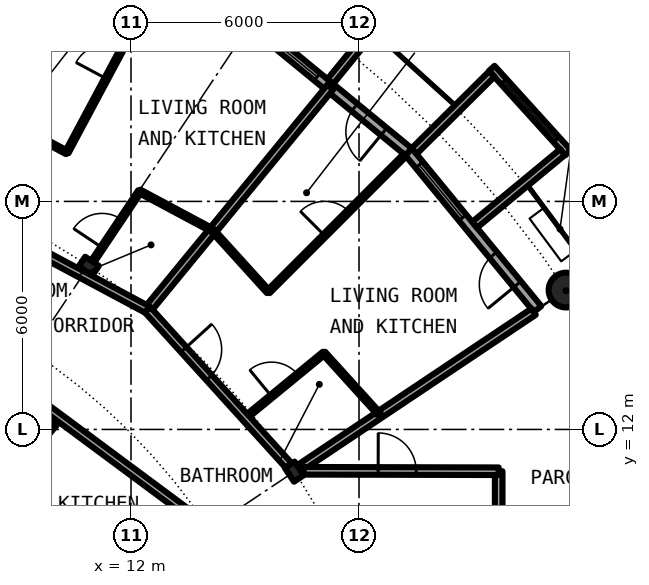
"""IFC4 building model, lengths in metres.
Left out: names, types, materials, properties, quantities, classifications, styles, units other than length and angle.
Written with IfcOpenShell. Run it as: python <this file> out.ifc"""

import sys

from ifc_helpers import new_model, si_unit, direction, frame, frame_2d, origin, origin_2d, place, context, subcontext, project, spatial, rectangle, circle, hollow_circle, i_section, extrude, element, fill, save


model = new_model("IFC4")
c1 = context("Model", 3, precision=1e-05, world=origin(), true_north=direction((0.0, 1.0)))
c2 = subcontext(c1, "Body", "Model", "MODEL_VIEW")
j1 = project(units=[si_unit("LENGTHUNIT", "METRE"), si_unit("PLANEANGLEUNIT", "RADIAN")], contexts=[c1])
p1 = place(None, origin())
s1 = spatial("IfcSite", under=j1, at=p1, CompositionType="ELEMENT")
p2 = place(p1, origin())
s2 = spatial("IfcBuilding", under=s1, at=p2, CompositionType="ELEMENT")
p3 = place(p2, frame((0.0, 0.0, 120.8)))
s3 = spatial("IfcBuildingStorey", under=s2, at=p3, CompositionType="ELEMENT", Elevation=120.8)
p4 = place(p3, frame((23.448, 15.667, 0.0), z_axis=(0.0, 0.0, 1.0), x_axis=(1.0, 0.0, 0.0)))
e1 = element("IfcColumn", 1, at=p4, inside=s3, PredefinedType="COLUMN", context=c2, shape_type="SweptSolid", body=[
    extrude(hollow_circle(Radius=0.457, WallThickness=0.04, at=origin_2d()), origin(), (0.0, 0.0, 1.0), 3.05),
])
for number, where, z_axis, x_axis in (
    (2, (16.297, 10.889, 0.0), (0.0, 0.0, 1.0), (0.831, 0.556, 0.0)),
    (3, (10.889, 16.297, 0.0), (0.0, 0.0, 1.0), (0.556, 0.831, 0.0)),
):
    element("IfcColumn", number, at=place(p3, frame(where, z_axis=z_axis, x_axis=x_axis)), inside=s3, PredefinedType="COLUMN", context=c2, shape_type="SweptSolid", body=[
        extrude(i_section(OverallWidth=0.307, OverallDepth=0.432, WebThickness=0.021, FlangeThickness=0.04, FilletRadius=0.027, at=origin_2d()), origin(), (0.0, 0.0, 1.0), 3.05),
    ])
p5 = place(p3, frame((22.699, 15.167, 0.0), z_axis=(0.0, 0.0, 1.0), x_axis=(-0.634382322723, 0.773019449054, 0.0)))
e4 = element("IfcWall", 4, at=p5, inside=s3, PredefinedType="SOLIDWALL", context=c2, shape_type="SweptSolid", body=[
    extrude(rectangle(XDim=5.352, YDim=0.25, at=frame_2d((2.676, 0.0))), origin(), (0.0, 0.0, 1.0), 2.7),
])
p6 = place(p5, frame((0.841, 0.0, 0.0)))
e5 = element("IfcOpeningElement", 5, at=p6, cuts=e4, PredefinedType="OPENING", context=c2, shape_type="SweptSolid", body=[
    extrude(rectangle(XDim=1.0, YDim=2.2, at=frame_2d((0.5, 1.1))), frame((0.0, 0.135, 0.0), z_axis=(0.0, -1.0, 0.0), x_axis=(1.0, 0.0, 0.0)), (0.0, 0.0, 1.0), 0.27),
])
p7 = place(p5, frame((3.111, 0.0, 0.3)))
e6 = element("IfcOpeningElement", 6, at=p7, cuts=e4, PredefinedType="OPENING", context=c2, shape_type="SweptSolid", body=[
    extrude(rectangle(XDim=1.8, YDim=2.1, at=frame_2d((0.9, 1.05))), frame((0.0, 0.135, 0.0), z_axis=(0.0, -1.0, 0.0), x_axis=(1.0, 0.0, 0.0)), (0.0, 0.0, 1.0), 0.27),
])
p8 = place(p3, frame((23.503, 19.282, -0.03), z_axis=(0.0, 0.0, 1.0), x_axis=(-0.671506829416, 0.740998365753, 0.0)))
e7 = element("IfcWall", 7, at=p8, inside=s3, PredefinedType="SOLIDWALL", context=c2, shape_type="SweptSolid", body=[
    extrude(rectangle(XDim=2.993, YDim=0.2, at=frame_2d((1.497, 0.0))), origin(), (0.0, 0.0, 1.0), 2.73),
])
p9 = place(p8, frame((0.457, 0.0, 0.33)))
e8 = element("IfcOpeningElement", 8, at=p9, cuts=e7, PredefinedType="OPENING", context=c2, shape_type="SweptSolid", body=[
    extrude(circle(Radius=1.04, at=frame_2d((1.04, 1.04))), frame((0.0, 0.11, 0.0), z_axis=(0.0, -1.0, 0.0), x_axis=(1.0, 0.0, 0.0)), (0.0, 0.0, 1.0), 0.22),
])
p10 = place(p3, frame((21.041, 17.384, -0.03), z_axis=(0.0, 0.0, 1.0), x_axis=(0.770784861449, 0.63709551667, 0.0)))
e9 = element("IfcWall", 9, at=p10, inside=s3, PredefinedType="SOLIDWALL", context=c2, shape_type="SweptSolid", body=[
    extrude(rectangle(XDim=3.006, YDim=0.2, at=frame_2d((1.503, 0.0))), origin(), (0.0, 0.0, 1.0), 2.73),
])
p11 = place(p3, frame((19.45, 19.323, -0.03), z_axis=(0.0, 0.0, 1.0), x_axis=(0.709727076896, 0.704476739375, 0.0)))
e10 = element("IfcWall", 10, at=p11, inside=s3, PredefinedType="SOLIDWALL", context=c2, shape_type="SweptSolid", body=[
    extrude(rectangle(XDim=2.883, YDim=0.2, at=frame_2d((1.441, 0.0))), origin(), (0.0, 0.0, 1.0), 2.73),
])
p12 = place(p3, frame((19.304, 19.304, 0.0), z_axis=(0.0, 0.0, 1.0), x_axis=(-0.773019449054, 0.634382322723, 0.0)))
e11 = element("IfcWall", 11, at=p12, inside=s3, PredefinedType="SOLIDWALL", context=c2, shape_type="SweptSolid", body=[
    extrude(rectangle(XDim=5.352, YDim=0.25, at=frame_2d((2.676, 0.0))), origin(), (0.0, 0.0, 1.0), 2.7),
])
p13 = place(p12, frame((0.841, 0.0, 0.0)))
e12 = element("IfcOpeningElement", 12, at=p13, cuts=e11, PredefinedType="OPENING", context=c2, shape_type="SweptSolid", body=[
    extrude(rectangle(XDim=1.0, YDim=2.2, at=frame_2d((0.5, 1.1))), frame((0.0, 0.135, 0.0), z_axis=(0.0, -1.0, 0.0), x_axis=(1.0, 0.0, 0.0)), (0.0, 0.0, 1.0), 0.27),
])
p14 = place(p12, frame((3.111, 0.0, 0.3)))
e13 = element("IfcOpeningElement", 13, at=p14, cuts=e11, PredefinedType="OPENING", context=c2, shape_type="SweptSolid", body=[
    extrude(rectangle(XDim=1.8, YDim=2.1, at=frame_2d((0.9, 1.05))), frame((0.0, 0.135, 0.0), z_axis=(0.0, -1.0, 0.0), x_axis=(1.0, 0.0, 0.0)), (0.0, 0.0, 1.0), 0.27),
])
p15 = place(p3, frame((17.246, 21.155, -0.03), z_axis=(0.0, 0.0, 1.0), x_axis=(0.631741648902, 0.775179004516, 0.0)))
e14 = element("IfcWall", 14, at=p15, inside=s3, PredefinedType="SOLIDWALL", context=c2, shape_type="SweptSolid", body=[
    extrude(rectangle(XDim=3.006, YDim=0.2, at=frame_2d((1.503, 0.0))), origin(), (0.0, 0.0, 1.0), 2.73),
])
p16 = place(p3, frame((21.675, 9.2, 0.0), z_axis=(0.0, 0.0, 1.0), x_axis=(0.0, 1.0, 0.0)))
e15 = element("IfcWall", 15, at=p16, inside=s3, PredefinedType="PARTITIONING", context=c2, shape_type="SweptSolid", body=[
    extrude(rectangle(XDim=1.7, YDim=0.2, at=frame_2d((0.85, 0.0))), origin(), (0.0, 0.0, 1.0), 2.7),
])
p17 = place(p3, frame((4.909, 5.958, 0.0), z_axis=(0.0, 0.0, 1.0), x_axis=(0.635976043025, 0.771708800454, 0.0)))
e16 = element("IfcWall", 16, at=p17, inside=s3, PredefinedType="PARTITIONING", context=c2, shape_type="SweptSolid", body=[
    extrude(rectangle(XDim=8.213, YDim=0.1, at=frame_2d((4.106, 0.0))), origin(), (0.0, 0.0, 1.0), 2.7),
])
p18 = place(p17, frame((6.49, 0.0, 0.0)))
e17 = element("IfcOpeningElement", 17, at=p18, cuts=e16, PredefinedType="OPENING", context=c2, shape_type="SweptSolid", body=[
    extrude(rectangle(XDim=0.9, YDim=2.3, at=frame_2d((0.45, 1.15))), frame((0.0, 0.06, 0.0), z_axis=(0.0, -1.0, 0.0), x_axis=(1.0, 0.0, 0.0)), (0.0, 0.0, 1.0), 0.12),
])
p19 = place(p17, frame((2.384, 0.0, 0.0)))
e18 = element("IfcOpeningElement", 18, at=p19, cuts=e16, PredefinedType="OPENING", context=c2, shape_type="SweptSolid", body=[
    extrude(rectangle(XDim=0.9, YDim=2.3, at=frame_2d((0.45, 1.15))), frame((0.0, 0.06, 0.0), z_axis=(0.0, -1.0, 0.0), x_axis=(1.0, 0.0, 0.0)), (0.0, 0.0, 1.0), 0.12),
])
p20 = place(p3, frame((8.392, 20.314, 0.0), z_axis=(0.0, 0.0, 1.0), x_axis=(0.381673756215, 0.924297107978, 0.0)))
e19 = element("IfcWall", 19, at=p20, inside=s3, PredefinedType="PARTITIONING", context=c2, shape_type="SweptSolid", body=[
    extrude(rectangle(XDim=5.195, YDim=0.1, at=frame_2d((2.598, 0.0))), origin(), (0.0, 0.0, 1.0), 2.7),
])
p21 = place(p3, frame((10.31, 19.289, 0.0), z_axis=(0.0, 0.0, 1.0), x_axis=(0.47140999111, 0.881914179658, 0.0)))
e20 = element("IfcWall", 20, at=p21, inside=s3, PredefinedType="PARTITIONING", context=c2, shape_type="SweptSolid", body=[
    extrude(rectangle(XDim=5.303, YDim=0.1, at=frame_2d((2.652, 0.0))), origin(), (0.0, 0.0, 1.0), 2.7),
])
p22 = place(p21, frame((2.202, 0.0, 0.0)))
e21 = element("IfcOpeningElement", 21, at=p22, cuts=e20, PredefinedType="OPENING", context=c2, shape_type="SweptSolid", body=[
    extrude(rectangle(XDim=0.9, YDim=2.3, at=frame_2d((0.45, 1.15))), frame((0.0, 0.06, 0.0), z_axis=(0.0, -1.0, 0.0), x_axis=(1.0, 0.0, 0.0)), (0.0, 0.0, 1.0), 0.12),
])
p23 = place(p3, frame((11.025, 16.466, 0.0), z_axis=(0.0, 0.0, 1.0), x_axis=(0.556469477731, 0.830868052313, 0.0)))
e22 = element("IfcWall", 22, at=p23, inside=s3, PredefinedType="PARTITIONING", context=c2, shape_type="SweptSolid", body=[
    extrude(rectangle(XDim=2.164, YDim=0.1, at=frame_2d((1.082, 0.0))), origin(), (0.0, 0.0, 1.0), 2.7),
])
p24 = place(p23, frame((0.383, 0.0, 0.0)))
e23 = element("IfcOpeningElement", 23, at=p24, cuts=e22, PredefinedType="OPENING", context=c2, shape_type="SweptSolid", body=[
    extrude(rectangle(XDim=0.9, YDim=2.3, at=frame_2d((0.45, 1.15))), frame((0.0, 0.06, 0.0), z_axis=(0.0, -1.0, 0.0), x_axis=(1.0, 0.0, 0.0)), (0.0, 0.0, 1.0), 0.12),
])
p25 = place(p3, frame((12.436, 15.149, 0.0), z_axis=(0.0, 0.0, 1.0), x_axis=(0.63447412651, 0.772944100689, 0.0)))
e24 = element("IfcWall", 24, at=p25, inside=s3, PredefinedType="PARTITIONING", context=c2, shape_type="SweptSolid", body=[
    extrude(rectangle(XDim=7.576, YDim=0.2, at=frame_2d((3.788, 0.0))), origin(), (0.0, 0.0, 1.0), 2.7),
])
p26 = place(p3, frame((15.01, 12.309, 0.0), z_axis=(0.0, 0.0, 1.0), x_axis=(0.773240932873, 0.634112339992, 0.0)))
e25 = element("IfcWall", 25, at=p26, inside=s3, PredefinedType="PARTITIONING", context=c2, shape_type="SweptSolid", body=[
    extrude(rectangle(XDim=2.674, YDim=0.1, at=frame_2d((1.337, 0.0))), origin(), (0.0, 0.0, 1.0), 2.7),
])
p27 = place(p26, frame((0.887, 0.0, 0.0)))
e26 = element("IfcOpeningElement", 26, at=p27, cuts=e25, PredefinedType="OPENING", context=c2, shape_type="SweptSolid", body=[
    extrude(rectangle(XDim=0.9, YDim=2.3, at=frame_2d((0.45, 1.15))), frame((0.0, 0.06, 0.0), z_axis=(0.0, -1.0, 0.0), x_axis=(1.0, 0.0, 0.0)), (0.0, 0.0, 1.0), 0.12),
])
p28 = place(p3, frame((15.613, 15.621, 0.0), z_axis=(0.0, 0.0, 1.0), x_axis=(0.706914880313, 0.707298629994, 0.0)))
e27 = element("IfcWall", 27, at=p28, inside=s3, PredefinedType="PARTITIONING", context=c2, shape_type="SweptSolid", body=[
    extrude(rectangle(XDim=5.09, YDim=0.1, at=frame_2d((2.545, 0.0))), origin(), (0.0, 0.0, 1.0), 2.7),
])
p29 = place(p28, frame((2.095, 0.0, 0.0)))
e28 = element("IfcOpeningElement", 28, at=p29, cuts=e27, PredefinedType="OPENING", context=c2, shape_type="SweptSolid", body=[
    extrude(rectangle(XDim=0.9, YDim=2.3, at=frame_2d((0.45, 1.15))), frame((0.0, 0.06, 0.0), z_axis=(0.0, -1.0, 0.0), x_axis=(1.0, 0.0, 0.0)), (0.0, 0.0, 1.0), 0.12),
])
p30 = place(p3, frame((16.477, 11.009, 0.0), z_axis=(0.0, 0.0, 1.0), x_axis=(0.831406593008, 0.555664536482, 0.0)))
e29 = element("IfcWall", 29, at=p30, inside=s3, PredefinedType="PARTITIONING", context=c2, shape_type="SweptSolid", body=[
    extrude(rectangle(XDim=7.358, YDim=0.2, at=frame_2d((3.679, 0.0))), origin(), (0.0, 0.0, 1.0), 2.7),
])
p31 = place(p3, frame((16.541, 10.912, 0.0), z_axis=(0.0, 0.0, 1.0), x_axis=(0.999997173357, -0.002377662213, 0.0)))
e30 = element("IfcWall", 30, at=p31, inside=s3, PredefinedType="PARTITIONING", context=c2, shape_type="SweptSolid", body=[
    extrude(rectangle(XDim=5.134, YDim=0.2, at=frame_2d((2.567, 0.0))), origin(), (0.0, 0.0, 1.0), 2.7),
])
p32 = place(p31, frame((1.963, 0.0, 0.0)))
e31 = element("IfcOpeningElement", 31, at=p32, cuts=e30, PredefinedType="OPENING", context=c2, shape_type="SweptSolid", body=[
    extrude(rectangle(XDim=1.0, YDim=2.3, at=frame_2d((0.5, 1.15))), frame((0.0, 0.11, 0.0), z_axis=(0.0, -1.0, 0.0), x_axis=(1.0, 0.0, 0.0)), (0.0, 0.0, 1.0), 0.22),
])
p33 = place(p3, frame((8.513, 10.332, 0.0), z_axis=(0.0, 0.0, 1.0), x_axis=(0.803149591038, -0.595777420196, 0.0)))
e32 = element("IfcWall", 32, at=p33, inside=s3, PredefinedType="PARTITIONING", context=c2, shape_type="SweptSolid", body=[
    extrude(rectangle(XDim=1.9, YDim=0.1, at=frame_2d((0.95, 0.0))), origin(), (0.0, 0.0, 1.0), 2.7),
])
p34 = place(p3, frame((4.906, 16.172, 0.0), z_axis=(0.0, 0.0, 1.0), x_axis=(0.803204584823, -0.59570327758, 0.0)))
e33 = element("IfcWall", 33, at=p34, inside=s3, PredefinedType="PARTITIONING", context=c2, shape_type="SweptSolid", body=[
    extrude(rectangle(XDim=11.387, YDim=0.2, at=frame_2d((5.693, 0.0))), origin(), (0.0, 0.0, 1.0), 2.7),
])
p35 = place(p34, frame((4.38, 0.0, 0.0)))
e34 = element("IfcOpeningElement", 34, at=p35, cuts=e33, PredefinedType="OPENING", context=c2, shape_type="SweptSolid", body=[
    extrude(rectangle(XDim=1.0, YDim=2.3, at=frame_2d((0.5, 1.15))), frame((0.0, 0.11, 0.0), z_axis=(0.0, -1.0, 0.0), x_axis=(1.0, 0.0, 0.0)), (0.0, 0.0, 1.0), 0.22),
])
p36 = place(p3, frame((5.687, 18.757, 0.0), z_axis=(0.0, 0.0, 1.0), x_axis=(0.8819312112, -0.471378127104, 0.0)))
e35 = element("IfcWall", 35, at=p36, inside=s3, PredefinedType="PARTITIONING", context=c2, shape_type="SweptSolid", body=[
    extrude(rectangle(XDim=7.65, YDim=0.2, at=frame_2d((3.825, 0.0))), origin(), (0.0, 0.0, 1.0), 2.39),
])
p37 = place(p36, frame((2.371, 0.0, 0.0)))
e36 = element("IfcOpeningElement", 36, at=p37, cuts=e35, PredefinedType="OPENING", context=c2, shape_type="SweptSolid", body=[
    extrude(rectangle(XDim=1.0, YDim=2.3, at=frame_2d((0.5, 1.15))), frame((0.0, 0.11, 0.0), z_axis=(0.0, -1.0, 0.0), x_axis=(1.0, 0.0, 0.0)), (0.0, 0.0, 1.0), 0.22),
])
p38 = place(p3, frame((12.434, 15.151, 0.0), z_axis=(0.0, 0.0, 1.0), x_axis=(0.671481997275, -0.741020868354, 0.0)))
e37 = element("IfcWall", 37, at=p38, inside=s3, PredefinedType="PARTITIONING", context=c2, shape_type="SweptSolid", body=[
    extrude(rectangle(XDim=5.596, YDim=0.2, at=frame_2d((2.798, 0.0))), origin(), (0.0, 0.0, 1.0), 2.39),
])
p39 = place(p38, frame((1.417, 0.0, 0.0)))
e38 = element("IfcOpeningElement", 38, at=p39, cuts=e37, PredefinedType="OPENING", context=c2, shape_type="SweptSolid", body=[
    extrude(rectangle(XDim=1.0, YDim=2.3, at=frame_2d((0.5, 1.15))), frame((0.0, 0.11, 0.0), z_axis=(0.0, -1.0, 0.0), x_axis=(1.0, 0.0, 0.0)), (0.0, 0.0, 1.0), 0.22),
])
p40 = place(p3, frame((6.471, 21.341, 0.0), z_axis=(0.0, 0.0, 1.0), x_axis=(0.881932070463, -0.471376519451, 0.0)))
e39 = element("IfcWall", 39, at=p40, inside=s3, PredefinedType="PARTITIONING", context=c2, shape_type="SweptSolid", body=[
    extrude(rectangle(XDim=4.355, YDim=0.1, at=frame_2d((2.178, 0.0))), origin(), (0.0, 0.0, 1.0), 2.7),
])
p41 = place(p40, frame((0.639, 0.0, 0.0)))
e40 = element("IfcOpeningElement", 40, at=p41, cuts=e39, PredefinedType="OPENING", context=c2, shape_type="SweptSolid", body=[
    extrude(rectangle(XDim=0.9, YDim=2.3, at=frame_2d((0.45, 1.15))), frame((0.0, 0.06, 0.0), z_axis=(0.0, -1.0, 0.0), x_axis=(1.0, 0.0, 0.0)), (0.0, 0.0, 1.0), 0.12),
])
p42 = place(p3, frame((12.223, 18.267, 0.0), z_axis=(0.0, 0.0, 1.0), x_axis=(0.881765102974, -0.47168877788, 0.0)))
e41 = element("IfcWall", 41, at=p42, inside=s3, PredefinedType="PARTITIONING", context=c2, shape_type="SweptSolid", body=[
    extrude(rectangle(XDim=2.176, YDim=0.1, at=frame_2d((1.088, 0.0))), origin(), (0.0, 0.0, 1.0), 2.7),
])
p43 = place(p3, frame((14.147, 17.238, 0.0), z_axis=(0.0, 0.0, 1.0), x_axis=(0.671674967707, -0.740845960882, 0.0)))
e42 = element("IfcWall", 42, at=p43, inside=s3, PredefinedType="PARTITIONING", context=c2, shape_type="SweptSolid", body=[
    extrude(rectangle(XDim=2.181, YDim=0.1, at=frame_2d((1.091, 0.0))), origin(), (0.0, 0.0, 1.0), 2.7),
])
p44 = place(p3, frame((17.072, 14.011, 0.0), z_axis=(0.0, 0.0, 1.0), x_axis=(0.67169789574, -0.740825172937, 0.0)))
e43 = element("IfcWall", 43, at=p44, inside=s3, PredefinedType="PARTITIONING", context=c2, shape_type="SweptSolid", body=[
    extrude(rectangle(XDim=2.183, YDim=0.1, at=frame_2d((1.091, 0.0))), origin(), (0.0, 0.0, 1.0), 2.7),
])
p45 = place(p6, origin())
e44 = element("IfcDoor", 44, at=p45, inside=s3, OperationType="SINGLE_SWING_LEFT", PredefinedType="DOOR", context=c2, shape_type="SweptSolid", body=[
    extrude(rectangle(XDim=1.0, YDim=2.2, at=frame_2d((0.5, 1.1))), frame((0.0, 0.025, 0.0), z_axis=(0.0, -1.0, 0.0), x_axis=(1.0, 0.0, 0.0)), (0.0, 0.0, 1.0), 0.05),
])
fill(e5, e44)
p46 = place(p7, origin())
e45 = element("IfcWindow", 45, at=p46, inside=s3, PartitioningType="SINGLE_PANEL", PredefinedType="WINDOW", context=c2, shape_type="SweptSolid", body=[
    extrude(rectangle(XDim=1.8, YDim=2.1, at=frame_2d((0.9, 1.05))), frame((0.0, 0.03, 0.0), z_axis=(0.0, -1.0, 0.0), x_axis=(1.0, 0.0, 0.0)), (0.0, 0.0, 1.0), 0.06),
])
fill(e6, e45)
p47 = place(p9, origin())
e46 = element("IfcWindow", 46, at=p47, inside=s3, PartitioningType="SINGLE_PANEL", PredefinedType="WINDOW", context=c2, shape_type="SweptSolid", body=[
    extrude(circle(Radius=1.04, at=frame_2d((1.04, 1.04))), frame((0.0, 0.03, 0.0), z_axis=(0.0, -1.0, 0.0), x_axis=(1.0, 0.0, 0.0)), (0.0, 0.0, 1.0), 0.06),
])
fill(e8, e46)
p48 = place(p13, origin())
e47 = element("IfcDoor", 47, at=p48, inside=s3, OperationType="SINGLE_SWING_LEFT", PredefinedType="DOOR", context=c2, shape_type="SweptSolid", body=[
    extrude(rectangle(XDim=1.0, YDim=2.2, at=frame_2d((0.5, 1.1))), frame((0.0, 0.025, 0.0), z_axis=(0.0, -1.0, 0.0), x_axis=(1.0, 0.0, 0.0)), (0.0, 0.0, 1.0), 0.05),
])
fill(e12, e47)
p49 = place(p14, origin())
e48 = element("IfcWindow", 48, at=p49, inside=s3, PartitioningType="SINGLE_PANEL", PredefinedType="WINDOW", context=c2, shape_type="SweptSolid", body=[
    extrude(rectangle(XDim=1.8, YDim=2.1, at=frame_2d((0.9, 1.05))), frame((0.0, 0.03, 0.0), z_axis=(0.0, -1.0, 0.0), x_axis=(1.0, 0.0, 0.0)), (0.0, 0.0, 1.0), 0.06),
])
fill(e13, e48)
p50 = place(p39, origin())
e49 = element("IfcDoor", 49, at=p50, inside=s3, OperationType="SINGLE_SWING_LEFT", PredefinedType="DOOR", context=c2, shape_type="SweptSolid", body=[
    extrude(rectangle(XDim=1.0, YDim=2.3, at=frame_2d((0.5, 1.15))), frame((0.0, 0.025, 0.0), z_axis=(0.0, -1.0, 0.0), x_axis=(1.0, 0.0, 0.0)), (0.0, 0.0, 1.0), 0.05),
])
fill(e38, e49)
p51 = place(p27, origin())
e50 = element("IfcDoor", 50, at=p51, inside=s3, OperationType="SINGLE_SWING_LEFT", PredefinedType="DOOR", context=c2, shape_type="SweptSolid", body=[
    extrude(rectangle(XDim=0.9, YDim=2.3, at=frame_2d((0.45, 1.15))), frame((0.0, 0.025, 0.0), z_axis=(0.0, -1.0, 0.0), x_axis=(1.0, 0.0, 0.0)), (0.0, 0.0, 1.0), 0.05),
])
fill(e26, e50)
p52 = place(p29, origin())
e51 = element("IfcDoor", 51, at=p52, inside=s3, OperationType="SINGLE_SWING_RIGHT", PredefinedType="DOOR", context=c2, shape_type="SweptSolid", body=[
    extrude(rectangle(XDim=0.9, YDim=2.3, at=frame_2d((0.45, 1.15))), frame((0.0, 0.025, 0.0), z_axis=(0.0, -1.0, 0.0), x_axis=(1.0, 0.0, 0.0)), (0.0, 0.0, 1.0), 0.05),
])
fill(e28, e51)
p53 = place(p24, origin())
e52 = element("IfcDoor", 52, at=p53, inside=s3, OperationType="SINGLE_SWING_LEFT", PredefinedType="DOOR", context=c2, shape_type="SweptSolid", body=[
    extrude(rectangle(XDim=0.9, YDim=2.3, at=frame_2d((0.45, 1.15))), frame((0.0, 0.025, 0.0), z_axis=(0.0, -1.0, 0.0), x_axis=(1.0, 0.0, 0.0)), (0.0, 0.0, 1.0), 0.05),
])
fill(e23, e52)
p54 = place(p22, origin())
e53 = element("IfcDoor", 53, at=p54, inside=s3, OperationType="SINGLE_SWING_RIGHT", PredefinedType="DOOR", context=c2, shape_type="SweptSolid", body=[
    extrude(rectangle(XDim=0.9, YDim=2.3, at=frame_2d((0.45, 1.15))), frame((0.0, 0.025, 0.0), z_axis=(0.0, -1.0, 0.0), x_axis=(1.0, 0.0, 0.0)), (0.0, 0.0, 1.0), 0.05),
])
fill(e21, e53)
p55 = place(p32, origin())
e54 = element("IfcDoor", 54, at=p55, inside=s3, OperationType="SINGLE_SWING_LEFT", PredefinedType="DOOR", context=c2, shape_type="SweptSolid", body=[
    extrude(rectangle(XDim=1.0, YDim=2.3, at=frame_2d((0.5, 1.15))), frame((0.0, 0.025, 0.0), z_axis=(0.0, -1.0, 0.0), x_axis=(1.0, 0.0, 0.0)), (0.0, 0.0, 1.0), 0.05),
])
fill(e31, e54)
save(model, sys.argv[1])
